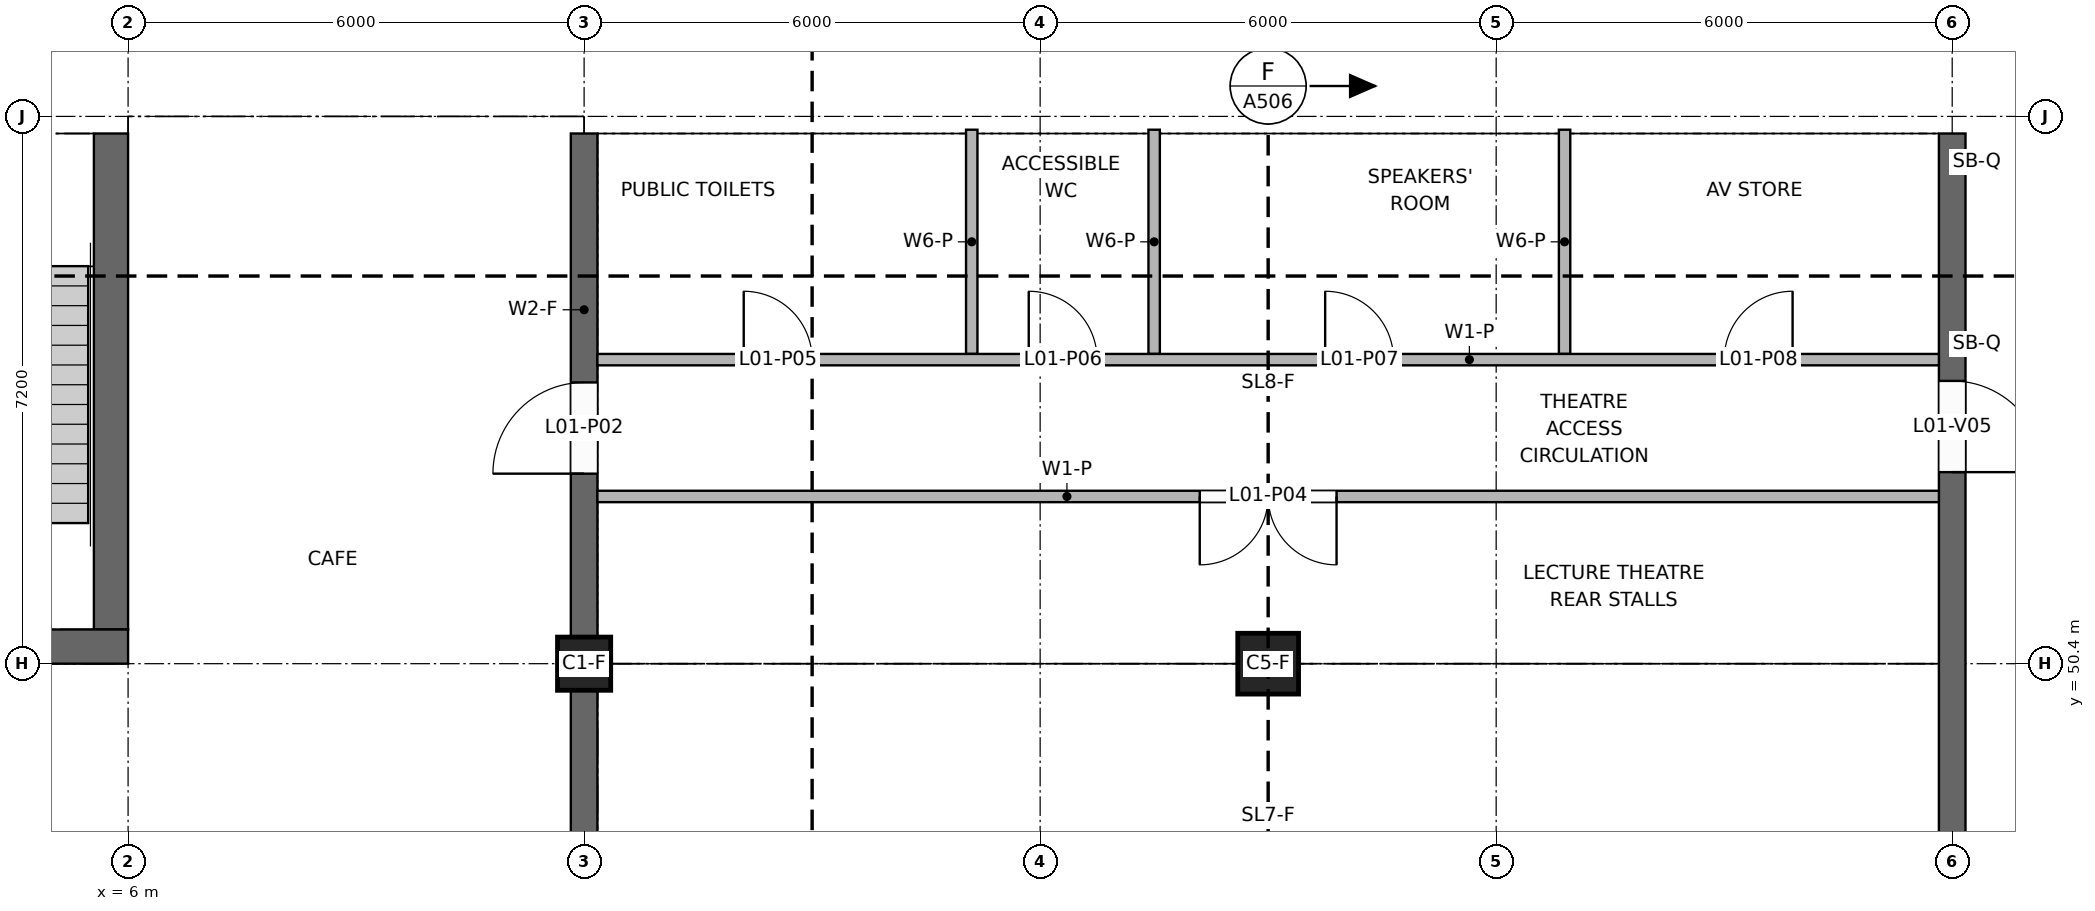
"""IFC4 building model, lengths in metres.
Left out: names, types, materials, properties, quantities, classifications, styles, units other than length and angle.
Written with IfcOpenShell. Run it as: python <this file> out.ifc"""

import sys

from ifc_helpers import new_model, si_unit, direction, frame, frame_2d, origin, origin_2d, place, context, subcontext, project, spatial, rectangle, extrude, element, fill, save


model = new_model("IFC4")
c1 = context("Model", 3, precision=1e-05, world=origin(), true_north=direction((0.0, 1.0)))
c2 = subcontext(c1, "Body", "Model", "MODEL_VIEW")
j1 = project(units=[si_unit("LENGTHUNIT", "METRE"), si_unit("PLANEANGLEUNIT", "RADIAN")], contexts=[c1])
p1 = place(None, origin())
s1 = spatial("IfcSite", under=j1, at=p1, CompositionType="ELEMENT")
p2 = place(p1, origin())
s2 = spatial("IfcBuilding", under=s1, at=p2, CompositionType="ELEMENT")
p3 = place(p2, frame((0.0, 0.0, 4.2)))
s3 = spatial("IfcBuildingStorey", under=s2, at=p3, CompositionType="ELEMENT", Elevation=4.2)
p4 = place(p3, frame((0.0, 50.625, 0.0), z_axis=(0.0, 0.0, 1.0), x_axis=(1.0, 0.0, 0.0)))
e1 = element("IfcWall", 1, at=p4, inside=s3, PredefinedType="SHEAR", context=c2, shape_type="SweptSolid", body=[
    extrude(rectangle(XDim=6.0, YDim=0.45, at=frame_2d((3.0, 0.0))), origin(), (0.0, 0.0, 1.0), 3.95),
])
p5 = place(p4, frame((2.4, 0.0, 0.0)))
e2 = element("IfcOpeningElement", 2, at=p5, cuts=e1, PredefinedType="OPENING", context=c2, shape_type="SweptSolid", body=[
    extrude(rectangle(XDim=1.2, YDim=2.1, at=frame_2d((0.6, 1.05))), frame((0.0, 0.235, 0.0), z_axis=(0.0, -1.0, 0.0), x_axis=(1.0, 0.0, 0.0)), (0.0, 0.0, 1.0), 0.47),
])
p6 = place(p3, frame((5.775, 50.85, 0.0), z_axis=(0.0, 0.0, 1.0), x_axis=(0.0, 1.0, 0.0)))
e3 = element("IfcWall", 3, at=p6, inside=s3, PredefinedType="SHEAR", context=c2, shape_type="SweptSolid", body=[
    extrude(rectangle(XDim=6.525, YDim=0.45, at=frame_2d((3.262, 0.0))), origin(), (0.0, 0.0, 1.0), 3.95),
])
p7 = place(p3, frame((0.0, 50.625, -0.2), z_axis=(0.0, 0.0, 1.0), x_axis=(1.0, 0.0, 0.0)))
e4 = element("IfcWall", 4, at=p7, inside=s3, PredefinedType="SOLIDWALL", context=c2, shape_type="SweptSolid", body=[
    extrude(rectangle(XDim=6.0, YDim=0.45, at=frame_2d((3.0, 0.0))), origin(), (0.0, 0.0, 1.0), 0.2),
])
p8 = place(p3, frame((5.775, 50.85, -0.2), z_axis=(0.0, 0.0, 1.0), x_axis=(0.0, 1.0, 0.0)))
e5 = element("IfcWall", 5, at=p8, inside=s3, PredefinedType="SOLIDWALL", context=c2, shape_type="SweptSolid", body=[
    extrude(rectangle(XDim=6.525, YDim=0.45, at=frame_2d((3.262, 0.0))), origin(), (0.0, 0.0, 1.0), 0.2),
])
p9 = place(p3, frame((12.0, 50.4, 0.0), z_axis=(0.0, 0.0, 1.0), x_axis=(1.0, 0.0, 0.0)))
e6 = element("IfcColumn", 6, at=p9, inside=s3, PredefinedType="COLUMN", context=c2, shape_type="SweptSolid", body=[
    extrude(rectangle(XDim=0.7, YDim=0.7, at=origin_2d()), origin(), (0.0, 0.0, 1.0), 3.95),
])
p10 = place(p3, frame((30.0, 35.825, 0.0), z_axis=(0.0, 0.0, 1.0), x_axis=(0.0, 1.0, 0.0)))
e7 = element("IfcWall", 7, at=p10, inside=s3, PredefinedType="SHEAR", context=c2, shape_type="SweptSolid", body=[
    extrude(rectangle(XDim=21.55, YDim=0.35, at=frame_2d((10.775, 0.0))), origin(), (0.0, 0.0, 1.0), 4.2),
])
p11 = place(p10, frame((1.095, 0.0, 0.0)))
e8 = element("IfcOpeningElement", 8, at=p11, cuts=e7, PredefinedType="OPENING", context=c2, shape_type="SweptSolid", body=[
    extrude(rectangle(XDim=1.2, YDim=2.4, at=frame_2d((0.6, 1.2))), frame((0.0, 0.185, 0.0), z_axis=(0.0, -1.0, 0.0), x_axis=(1.0, 0.0, 0.0)), (0.0, 0.0, 1.0), 0.37),
])
p12 = place(p10, frame((9.575, 0.0, 0.0)))
e9 = element("IfcOpeningElement", 9, at=p12, cuts=e7, PredefinedType="OPENING", context=c2, shape_type="SweptSolid", body=[
    extrude(rectangle(XDim=1.2, YDim=2.4, at=frame_2d((0.6, 1.2))), frame((0.0, 0.185, 0.0), z_axis=(0.0, -1.0, 0.0), x_axis=(1.0, 0.0, 0.0)), (0.0, 0.0, 1.0), 0.37),
])
p13 = place(p10, frame((17.095, 0.0, 0.0)))
e10 = element("IfcOpeningElement", 10, at=p13, cuts=e7, PredefinedType="OPENING", context=c2, shape_type="SweptSolid", body=[
    extrude(rectangle(XDim=1.2, YDim=2.4, at=frame_2d((0.6, 1.2))), frame((0.0, 0.185, 0.0), z_axis=(0.0, -1.0, 0.0), x_axis=(1.0, 0.0, 0.0)), (0.0, 0.0, 1.0), 0.37),
])
p14 = place(p3, frame((12.0, 43.55, 0.0), z_axis=(0.0, 0.0, 1.0), x_axis=(0.0, 1.0, 0.0)))
e11 = element("IfcWall", 11, at=p14, inside=s3, PredefinedType="SHEAR", context=c2, shape_type="SweptSolid", body=[
    extrude(rectangle(XDim=6.5, YDim=0.35, at=frame_2d((3.25, 0.0))), origin(), (0.0, 0.0, 1.0), 3.05),
])
p15 = place(p3, frame((12.0, 50.75, 0.0), z_axis=(0.0, 0.0, 1.0), x_axis=(0.0, 1.0, 0.0)))
e12 = element("IfcWall", 12, at=p15, inside=s3, PredefinedType="SHEAR", context=c2, shape_type="SweptSolid", body=[
    extrude(rectangle(XDim=6.625, YDim=0.35, at=frame_2d((3.312, 0.0))), origin(), (0.0, 0.0, 1.0), 3.05),
])
p16 = place(p15, frame((2.15, 0.0, 0.0)))
e13 = element("IfcOpeningElement", 13, at=p16, cuts=e12, PredefinedType="OPENING", context=c2, shape_type="SweptSolid", body=[
    extrude(rectangle(XDim=1.2, YDim=2.1, at=frame_2d((0.6, 1.05))), frame((0.0, 0.185, 0.0), z_axis=(0.0, -1.0, 0.0), x_axis=(1.0, 0.0, 0.0)), (0.0, 0.0, 1.0), 0.37),
])
p17 = place(p3, frame((21.0, 50.4, -0.2), z_axis=(0.0, 0.0, 1.0), x_axis=(1.0, 0.0, 0.0)))
e14 = element("IfcColumn", 14, at=p17, inside=s3, PredefinedType="COLUMN", context=c2, shape_type="SweptSolid", body=[
    extrude(rectangle(XDim=0.8, YDim=0.8, at=origin_2d()), origin(), (0.0, 0.0, 1.0), 4.4),
])
p18 = place(p3, frame((0.0, 57.6, -0.25), z_axis=(0.0, 0.0, 1.0), x_axis=(1.0, 0.0, 0.0)))
e15 = element("IfcWall", 15, at=p18, inside=s3, PredefinedType="SOLIDWALL", context=c2, shape_type="SweptSolid", body=[
    extrude(rectangle(XDim=30.0, YDim=0.45, at=frame_2d((15.0, 0.0))), origin(), (0.0, 0.0, 1.0), 4.2),
])
p19 = place(p3, frame((30.0, 57.6, -0.25), z_axis=(0.0, 0.0, 1.0), x_axis=(1.0, 0.0, 0.0)))
e16 = element("IfcWall", 16, at=p19, inside=s3, PredefinedType="SOLIDWALL", context=c2, shape_type="SweptSolid", body=[
    extrude(rectangle(XDim=6.0, YDim=0.45, at=frame_2d((3.0, 0.0))), origin(), (0.0, 0.0, 1.0), 4.25),
])
for number, where, z_axis, x_axis in (
    (17, (17.1, 54.475, 0.0), (0.0, 0.0, 1.0), (0.0, 1.0, 0.0)),
    (18, (19.5, 54.475, 0.0), (0.0, 0.0, 1.0), (0.0, 1.0, 0.0)),
    (19, (24.9, 54.475, 0.0), (0.0, 0.0, 1.0), (0.0, 1.0, 0.0)),
):
    element("IfcWall", number, at=place(p3, frame(where, z_axis=z_axis, x_axis=x_axis)), inside=s3, PredefinedType="PARTITIONING", context=c2, shape_type="SweptSolid", body=[
        extrude(rectangle(XDim=2.95, YDim=0.15, at=frame_2d((1.475, 0.0))), origin(), (0.0, 0.0, 1.0), 3.95),
    ])
p20 = place(p3, frame((12.175, 52.6, 0.0), z_axis=(0.0, 0.0, 1.0), x_axis=(1.0, 0.0, 0.0)))
e20 = element("IfcWall", 20, at=p20, inside=s3, PredefinedType="PARTITIONING", context=c2, shape_type="SweptSolid", body=[
    extrude(rectangle(XDim=17.65, YDim=0.15, at=frame_2d((8.825, 0.0))), origin(), (0.0, 0.0, 1.0), 3.05),
])
p21 = place(p20, frame((7.925, 0.0, 0.0)))
e21 = element("IfcOpeningElement", 21, at=p21, cuts=e20, PredefinedType="OPENING", context=c2, shape_type="SweptSolid", body=[
    extrude(rectangle(XDim=1.8, YDim=2.1, at=frame_2d((0.9, 1.05))), frame((0.0, 0.085, 0.0), z_axis=(0.0, -1.0, 0.0), x_axis=(1.0, 0.0, 0.0)), (0.0, 0.0, 1.0), 0.17),
])
p22 = place(p3, frame((12.175, 54.4, 0.0), z_axis=(0.0, 0.0, 1.0), x_axis=(1.0, 0.0, 0.0)))
e22 = element("IfcWall", 22, at=p22, inside=s3, PredefinedType="PARTITIONING", context=c2, shape_type="SweptSolid", body=[
    extrude(rectangle(XDim=17.65, YDim=0.15, at=frame_2d((8.825, 0.0))), origin(), (0.0, 0.0, 1.0), 3.05),
])
p23 = place(p22, frame((1.925, 0.0, 0.0)))
e23 = element("IfcOpeningElement", 23, at=p23, cuts=e22, PredefinedType="OPENING", context=c2, shape_type="SweptSolid", body=[
    extrude(rectangle(XDim=0.9, YDim=2.1, at=frame_2d((0.45, 1.05))), frame((0.0, 0.085, 0.0), z_axis=(0.0, -1.0, 0.0), x_axis=(1.0, 0.0, 0.0)), (0.0, 0.0, 1.0), 0.17),
])
p24 = place(p22, frame((5.675, 0.0, 0.0)))
e24 = element("IfcOpeningElement", 24, at=p24, cuts=e22, PredefinedType="OPENING", context=c2, shape_type="SweptSolid", body=[
    extrude(rectangle(XDim=0.9, YDim=2.1, at=frame_2d((0.45, 1.05))), frame((0.0, 0.085, 0.0), z_axis=(0.0, -1.0, 0.0), x_axis=(1.0, 0.0, 0.0)), (0.0, 0.0, 1.0), 0.17),
])
p25 = place(p22, frame((9.575, 0.0, 0.0)))
e25 = element("IfcOpeningElement", 25, at=p25, cuts=e22, PredefinedType="OPENING", context=c2, shape_type="SweptSolid", body=[
    extrude(rectangle(XDim=0.9, YDim=2.1, at=frame_2d((0.45, 1.05))), frame((0.0, 0.085, 0.0), z_axis=(0.0, -1.0, 0.0), x_axis=(1.0, 0.0, 0.0)), (0.0, 0.0, 1.0), 0.17),
])
p26 = place(p22, frame((14.825, 0.0, 0.0)))
e26 = element("IfcOpeningElement", 26, at=p26, cuts=e22, PredefinedType="OPENING", context=c2, shape_type="SweptSolid", body=[
    extrude(rectangle(XDim=0.9, YDim=2.1, at=frame_2d((0.45, 1.05))), frame((0.0, 0.085, 0.0), z_axis=(0.0, -1.0, 0.0), x_axis=(1.0, 0.0, 0.0)), (0.0, 0.0, 1.0), 0.17),
])
p27 = place(p13, frame((1.2, 0.0, 0.0), z_axis=(0.0, 0.0, 1.0), x_axis=(-1.0, 0.0, 0.0)))
e27 = element("IfcDoor", 27, at=p27, inside=s3, OperationType="SINGLE_SWING_RIGHT", PredefinedType="DOOR", context=c2, shape_type="SweptSolid", body=[
    extrude(rectangle(XDim=1.2, YDim=2.4, at=frame_2d((0.6, 1.2))), frame((0.0, 0.025, 0.0), z_axis=(0.0, -1.0, 0.0), x_axis=(1.0, 0.0, 0.0)), (0.0, 0.0, 1.0), 0.05),
])
fill(e10, e27)
p28 = place(p16, origin())
e28 = element("IfcDoor", 28, at=p28, inside=s3, OperationType="SINGLE_SWING_LEFT", PredefinedType="DOOR", context=c2, shape_type="SweptSolid", body=[
    extrude(rectangle(XDim=1.2, YDim=2.1, at=frame_2d((0.6, 1.05))), frame((0.0, 0.025, 0.0), z_axis=(0.0, -1.0, 0.0), x_axis=(1.0, 0.0, 0.0)), (0.0, 0.0, 1.0), 0.05),
])
fill(e13, e28)
p29 = place(p21, frame((1.8, 0.0, 0.0), z_axis=(0.0, 0.0, 1.0), x_axis=(-1.0, 0.0, 0.0)))
e29 = element("IfcDoor", 29, at=p29, inside=s3, OperationType="DOUBLE_DOOR_SINGLE_SWING", PredefinedType="DOOR", context=c2, shape_type="SweptSolid", body=[
    extrude(rectangle(XDim=1.8, YDim=2.1, at=frame_2d((0.9, 1.05))), frame((0.0, 0.025, 0.0), z_axis=(0.0, -1.0, 0.0), x_axis=(1.0, 0.0, 0.0)), (0.0, 0.0, 1.0), 0.05),
])
fill(e21, e29)
p30 = place(p23, origin())
e30 = element("IfcDoor", 30, at=p30, inside=s3, OperationType="SINGLE_SWING_LEFT", PredefinedType="DOOR", context=c2, shape_type="SweptSolid", body=[
    extrude(rectangle(XDim=0.9, YDim=2.1, at=frame_2d((0.45, 1.05))), frame((0.0, 0.025, 0.0), z_axis=(0.0, -1.0, 0.0), x_axis=(1.0, 0.0, 0.0)), (0.0, 0.0, 1.0), 0.05),
])
fill(e23, e30)
p31 = place(p24, origin())
e31 = element("IfcDoor", 31, at=p31, inside=s3, OperationType="SINGLE_SWING_LEFT", PredefinedType="DOOR", context=c2, shape_type="SweptSolid", body=[
    extrude(rectangle(XDim=0.9, YDim=2.1, at=frame_2d((0.45, 1.05))), frame((0.0, 0.025, 0.0), z_axis=(0.0, -1.0, 0.0), x_axis=(1.0, 0.0, 0.0)), (0.0, 0.0, 1.0), 0.05),
])
fill(e24, e31)
p32 = place(p25, origin())
e32 = element("IfcDoor", 32, at=p32, inside=s3, OperationType="SINGLE_SWING_LEFT", PredefinedType="DOOR", context=c2, shape_type="SweptSolid", body=[
    extrude(rectangle(XDim=0.9, YDim=2.1, at=frame_2d((0.45, 1.05))), frame((0.0, 0.025, 0.0), z_axis=(0.0, -1.0, 0.0), x_axis=(1.0, 0.0, 0.0)), (0.0, 0.0, 1.0), 0.05),
])
fill(e25, e32)
p33 = place(p26, origin())
e33 = element("IfcDoor", 33, at=p33, inside=s3, OperationType="SINGLE_SWING_RIGHT", PredefinedType="DOOR", context=c2, shape_type="SweptSolid", body=[
    extrude(rectangle(XDim=0.9, YDim=2.1, at=frame_2d((0.45, 1.05))), frame((0.0, 0.025, 0.0), z_axis=(0.0, -1.0, 0.0), x_axis=(1.0, 0.0, 0.0)), (0.0, 0.0, 1.0), 0.05),
])
fill(e26, e33)
save(model, sys.argv[1])
